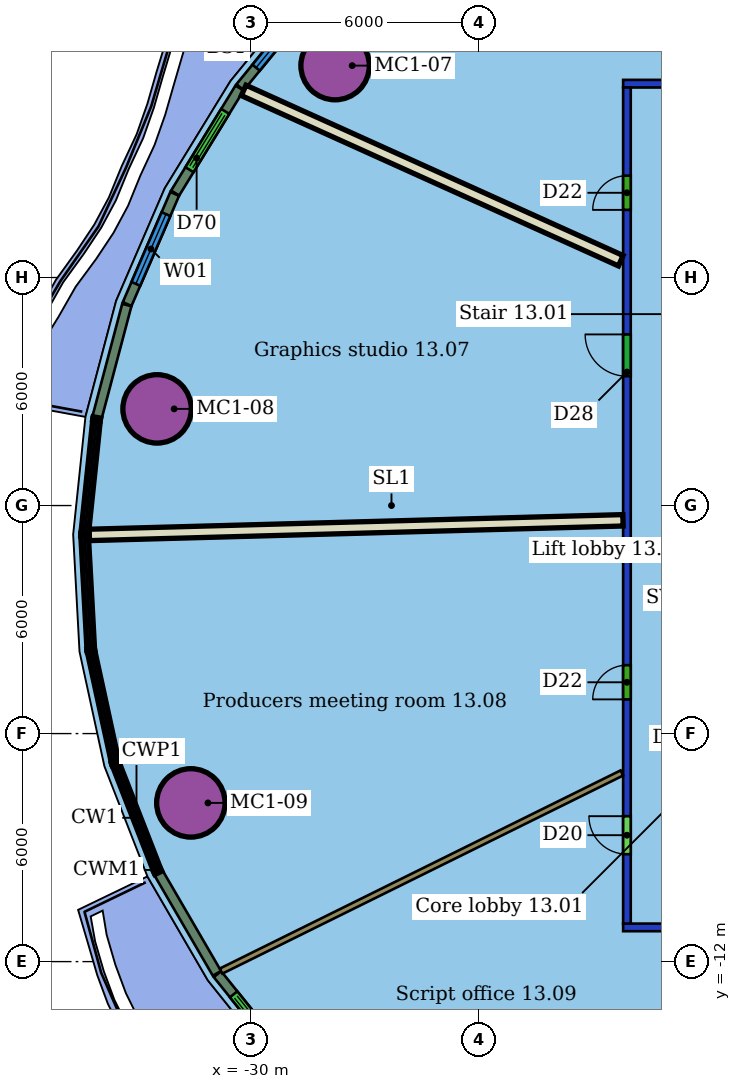
"""IFC4 building model, lengths in metres.
Left out: names, types, materials, properties, quantities, classifications, styles, units other than length and angle.
Written with IfcOpenShell. Run it as: python <this file> out.ifc"""

import sys

from ifc_helpers import new_model, si_unit, direction, frame, frame_2d, origin, origin_2d, place, context, subcontext, project, spatial, rectangle, hollow_circle, extrude, element, fill, save


model = new_model("IFC4")
c1 = context("Model", 3, precision=1e-05, world=origin(), true_north=direction((0.0, 1.0)))
c2 = subcontext(c1, "Body", "Model", "MODEL_VIEW")
j1 = project(units=[si_unit("LENGTHUNIT", "METRE"), si_unit("PLANEANGLEUNIT", "RADIAN")], contexts=[c1])
p1 = place(None, origin())
s1 = spatial("IfcSite", under=j1, at=p1, CompositionType="ELEMENT")
p2 = place(p1, origin())
s2 = spatial("IfcBuilding", under=s1, at=p2, CompositionType="ELEMENT")
p3 = place(p2, frame((0.0, 0.0, 65.6)))
s3 = spatial("IfcBuildingStorey", under=s2, at=p3, CompositionType="ELEMENT", Elevation=65.6)
for number, where, z_axis, x_axis in (
    (1, (-27.78, 11.576, 0.0), (0.0, 0.0, 1.0), (1.0, 0.0, 0.0)),
    (2, (-32.464, 2.543, 0.0), (0.0, 0.0, 1.0), (1.0, 0.0, 0.0)),
    (3, (-31.575, -7.824, 0.0), (0.0, 0.0, 1.0), (1.0, 0.0, 0.0)),
):
    element("IfcColumn", number, at=place(p3, frame(where, z_axis=z_axis, x_axis=x_axis)), inside=s3, PredefinedType="COLUMN", context=c2, shape_type="SweptSolid", body=[
        extrude(hollow_circle(Radius=0.9, WallThickness=0.06, at=origin_2d()), origin(), (0.0, 0.0, 1.0), 3.55),
    ])
p4 = place(p3, frame((8.2, -11.1, 0.0), z_axis=(0.0, 0.0, 1.0), x_axis=(-1.0, 0.0, 0.0)))
e4 = element("IfcWall", 4, at=p4, inside=s3, PredefinedType="PARTITIONING", context=c2, shape_type="SweptSolid", body=[
    extrude(rectangle(XDim=28.4, YDim=0.2, at=frame_2d((14.2, 0.0))), origin(), (0.0, 0.0, 1.0), 2.85),
])
p5 = place(p4, frame((19.964, 0.0, 0.0)))
e5 = element("IfcOpeningElement", 5, at=p5, cuts=e4, PredefinedType="OPENING", context=c2, shape_type="SweptSolid", body=[
    extrude(rectangle(XDim=1.1, YDim=2.1, at=frame_2d((0.55, 1.05))), frame((0.0, 0.11, 0.0), z_axis=(0.0, -1.0, 0.0), x_axis=(1.0, 0.0, 0.0)), (0.0, 0.0, 1.0), 0.22),
])
p6 = place(p4, frame((15.239, 0.0, 0.0)))
e6 = element("IfcOpeningElement", 6, at=p6, cuts=e4, PredefinedType="OPENING", context=c2, shape_type="SweptSolid", body=[
    extrude(rectangle(XDim=1.5, YDim=2.1, at=frame_2d((0.75, 1.05))), frame((0.0, 0.11, 0.0), z_axis=(0.0, -1.0, 0.0), x_axis=(1.0, 0.0, 0.0)), (0.0, 0.0, 1.0), 0.22),
])
p7 = place(p4, frame((7.453, 0.0, 0.0)))
e7 = element("IfcOpeningElement", 7, at=p7, cuts=e4, PredefinedType="OPENING", context=c2, shape_type="SweptSolid", body=[
    extrude(rectangle(XDim=1.8, YDim=2.1, at=frame_2d((0.9, 1.05))), frame((0.0, 0.11, 0.0), z_axis=(0.0, -1.0, 0.0), x_axis=(1.0, 0.0, 0.0)), (0.0, 0.0, 1.0), 0.22),
])
p8 = place(p3, frame((-20.1, -11.0, 0.0), z_axis=(0.0, 0.0, 1.0), x_axis=(0.0, 1.0, 0.0)))
e8 = element("IfcWall", 8, at=p8, inside=s3, PredefinedType="PARTITIONING", context=c2, shape_type="SweptSolid", body=[
    extrude(rectangle(XDim=22.0, YDim=0.2, at=frame_2d((11.0, 0.0))), origin(), (0.0, 0.0, 1.0), 2.85),
])
p9 = place(p8, frame((18.78, 0.0, 0.0)))
e9 = element("IfcOpeningElement", 9, at=p9, cuts=e8, PredefinedType="OPENING", context=c2, shape_type="SweptSolid", body=[
    extrude(rectangle(XDim=0.9, YDim=2.1, at=frame_2d((0.45, 1.05))), frame((0.0, 0.11, 0.0), z_axis=(0.0, -1.0, 0.0), x_axis=(1.0, 0.0, 0.0)), (0.0, 0.0, 1.0), 0.22),
])
p10 = place(p8, frame((14.403, 0.0, 0.0)))
e10 = element("IfcOpeningElement", 10, at=p10, cuts=e8, PredefinedType="OPENING", context=c2, shape_type="SweptSolid", body=[
    extrude(rectangle(XDim=1.1, YDim=2.1, at=frame_2d((0.55, 1.05))), frame((0.0, 0.11, 0.0), z_axis=(0.0, -1.0, 0.0), x_axis=(1.0, 0.0, 0.0)), (0.0, 0.0, 1.0), 0.22),
])
p11 = place(p8, frame((5.9, 0.0, 0.0)))
e11 = element("IfcOpeningElement", 11, at=p11, cuts=e8, PredefinedType="OPENING", context=c2, shape_type="SweptSolid", body=[
    extrude(rectangle(XDim=0.9, YDim=2.1, at=frame_2d((0.45, 1.05))), frame((0.0, 0.11, 0.0), z_axis=(0.0, -1.0, 0.0), x_axis=(1.0, 0.0, 0.0)), (0.0, 0.0, 1.0), 0.22),
])
p12 = place(p8, frame((1.826, 0.0, 0.0)))
e12 = element("IfcOpeningElement", 12, at=p12, cuts=e8, PredefinedType="OPENING", context=c2, shape_type="SweptSolid", body=[
    extrude(rectangle(XDim=1.0, YDim=2.1, at=frame_2d((0.5, 1.05))), frame((0.0, 0.11, 0.0), z_axis=(0.0, -1.0, 0.0), x_axis=(1.0, 0.0, 0.0)), (0.0, 0.0, 1.0), 0.22),
])
p13 = place(p3, frame((-20.2, 11.1, 0.0), z_axis=(0.0, 0.0, 1.0), x_axis=(1.0, 0.0, 0.0)))
e13 = element("IfcWall", 13, at=p13, inside=s3, PredefinedType="PARTITIONING", context=c2, shape_type="SweptSolid", body=[
    extrude(rectangle(XDim=28.4, YDim=0.2, at=frame_2d((14.2, 0.0))), origin(), (0.0, 0.0, 1.0), 2.85),
])
p14 = place(p13, frame((23.828, 0.0, 0.0)))
e14 = element("IfcOpeningElement", 14, at=p14, cuts=e13, PredefinedType="OPENING", context=c2, shape_type="SweptSolid", body=[
    extrude(rectangle(XDim=1.5, YDim=2.1, at=frame_2d((0.75, 1.05))), frame((0.0, 0.11, 0.0), z_axis=(0.0, -1.0, 0.0), x_axis=(1.0, 0.0, 0.0)), (0.0, 0.0, 1.0), 0.22),
])
p15 = place(p13, frame((19.006, 0.0, 0.0)))
e15 = element("IfcOpeningElement", 15, at=p15, cuts=e13, PredefinedType="OPENING", context=c2, shape_type="SweptSolid", body=[
    extrude(rectangle(XDim=1.0, YDim=2.1, at=frame_2d((0.5, 1.05))), frame((0.0, 0.11, 0.0), z_axis=(0.0, -1.0, 0.0), x_axis=(1.0, 0.0, 0.0)), (0.0, 0.0, 1.0), 0.22),
])
p16 = place(p13, frame((10.323, 0.0, 0.0)))
e16 = element("IfcOpeningElement", 16, at=p16, cuts=e13, PredefinedType="OPENING", context=c2, shape_type="SweptSolid", body=[
    extrude(rectangle(XDim=1.2, YDim=2.1, at=frame_2d((0.6, 1.05))), frame((0.0, 0.11, 0.0), z_axis=(0.0, -1.0, 0.0), x_axis=(1.0, 0.0, 0.0)), (0.0, 0.0, 1.0), 0.22),
])
p17 = place(p13, frame((6.36, 0.0, 0.0)))
e17 = element("IfcOpeningElement", 17, at=p17, cuts=e13, PredefinedType="OPENING", context=c2, shape_type="SweptSolid", body=[
    extrude(rectangle(XDim=1.0, YDim=2.1, at=frame_2d((0.5, 1.05))), frame((0.0, 0.11, 0.0), z_axis=(0.0, -1.0, 0.0), x_axis=(1.0, 0.0, 0.0)), (0.0, 0.0, 1.0), 0.22),
])
p18 = place(p3, frame((-22.749, 17.95, 0.0), z_axis=(0.0, 0.0, 1.0), x_axis=(0.682209065128, -0.731157159205, 0.0)))
e18 = element("IfcWall", 18, at=p18, inside=s3, PredefinedType="PARTITIONING", context=c2, shape_type="SweptSolid", body=[
    extrude(rectangle(XDim=9.163, YDim=0.15, at=frame_2d((4.581, 0.0))), origin(), (0.0, 0.0, 1.0), 3.55),
])
p19 = place(p3, frame((-30.186, 10.924, 0.0), z_axis=(0.0, 0.0, 1.0), x_axis=(0.91135893381, -0.411612552973, 0.0)))
e19 = element("IfcWall", 19, at=p19, inside=s3, PredefinedType="PARTITIONING", context=c2, shape_type="SweptSolid", body=[
    extrude(rectangle(XDim=10.889, YDim=0.3, at=frame_2d((5.445, 0.0))), origin(), (0.0, 0.0, 1.0), 3.55),
])
p20 = place(p3, frame((-34.247, -0.773, 0.0), z_axis=(0.0, 0.0, 1.0), x_axis=(0.999625818084, 0.027353680181, 0.0)))
e20 = element("IfcWall", 20, at=p20, inside=s3, PredefinedType="PARTITIONING", context=c2, shape_type="SweptSolid", body=[
    extrude(rectangle(XDim=14.049, YDim=0.3, at=frame_2d((7.024, 0.0))), origin(), (0.0, 0.0, 1.0), 3.55),
])
p21 = place(p3, frame((-30.78, -12.25, 0.0), z_axis=(0.0, 0.0, 1.0), x_axis=(0.89644340997, 0.443158225379, 0.0)))
e21 = element("IfcWall", 21, at=p21, inside=s3, PredefinedType="PARTITIONING", context=c2, shape_type="SweptSolid", body=[
    extrude(rectangle(XDim=11.765, YDim=0.15, at=frame_2d((5.882, 0.0))), origin(), (0.0, 0.0, 1.0), 3.55),
])
p22 = place(p3, frame((-23.706, -18.873, 0.0), z_axis=(0.0, 0.0, 1.0), x_axis=(0.684203954535, 0.729290716106, 0.0)))
e22 = element("IfcWall", 22, at=p22, inside=s3, PredefinedType="PARTITIONING", context=c2, shape_type="SweptSolid", body=[
    extrude(rectangle(XDim=10.38, YDim=0.3, at=frame_2d((5.19, 0.0))), origin(), (0.0, 0.0, 1.0), 3.55),
])
p23 = place(p3, frame((-28.172, 13.585, 0.0), z_axis=(0.0, 0.0, 1.0), x_axis=(-0.632874527105, -0.774254372246, 0.0)))
e23 = element("IfcWall", 23, at=p23, inside=s3, PredefinedType="SOLIDWALL", context=c2, shape_type="SweptSolid", body=[
    extrude(rectangle(XDim=3.331, YDim=0.25, at=frame_2d((1.666, 0.0))), origin(), (0.0, 0.0, 1.0), 3.15),
])
p24 = place(p23, frame((0.666, 0.0, 0.8)))
e24 = element("IfcOpeningElement", 24, at=p24, cuts=e23, PredefinedType="OPENING", context=c2, shape_type="SweptSolid", body=[
    extrude(rectangle(XDim=2.0, YDim=2.2, at=frame_2d((1.0, 1.1))), frame((0.0, 0.135, 0.0), z_axis=(0.0, -1.0, 0.0), x_axis=(1.0, 0.0, 0.0)), (0.0, 0.0, 1.0), 0.27),
])
p25 = place(p3, frame((-30.294, 10.985, 0.0), z_axis=(0.0, 0.0, 1.0), x_axis=(-0.522692781457, -0.852521117752, 0.0)))
e25 = element("IfcWall", 25, at=p25, inside=s3, PredefinedType="SOLIDWALL", context=c2, shape_type="SweptSolid", body=[
    extrude(rectangle(XDim=3.241, YDim=0.25, at=frame_2d((1.62, 0.0))), origin(), (0.0, 0.0, 1.0), 3.15),
])
p26 = place(p25, frame((0.72, 0.0, 0.0)))
e26 = element("IfcOpeningElement", 26, at=p26, cuts=e25, PredefinedType="OPENING", context=c2, shape_type="SweptSolid", body=[
    extrude(rectangle(XDim=1.8, YDim=2.4, at=frame_2d((0.9, 1.2))), frame((0.0, 0.135, 0.0), z_axis=(0.0, -1.0, 0.0), x_axis=(1.0, 0.0, 0.0)), (0.0, 0.0, 1.0), 0.27),
])
p27 = place(p3, frame((-32.0, 8.2, 0.0), z_axis=(0.0, 0.0, 1.0), x_axis=(-0.396530812493, -0.918021413009, 0.0)))
e27 = element("IfcWall", 27, at=p27, inside=s3, PredefinedType="SOLIDWALL", context=c2, shape_type="SweptSolid", body=[
    extrude(rectangle(XDim=3.157, YDim=0.25, at=frame_2d((1.579, 0.0))), origin(), (0.0, 0.0, 1.0), 3.15),
])
p28 = place(p27, frame((0.579, 0.0, 0.8)))
e28 = element("IfcOpeningElement", 28, at=p28, cuts=e27, PredefinedType="OPENING", context=c2, shape_type="SweptSolid", body=[
    extrude(rectangle(XDim=2.0, YDim=2.2, at=frame_2d((1.0, 1.1))), frame((0.0, 0.135, 0.0), z_axis=(0.0, -1.0, 0.0), x_axis=(1.0, 0.0, 0.0)), (0.0, 0.0, 1.0), 0.27),
])
for number, where, z_axis, x_axis in (
    (29, (-33.26, 5.276, 0.0), (0.0, 0.0, 1.0), (-0.256, -0.967, 0.0)),
    (30, (-32.421, -9.676, 0.0), (0.0, 0.0, 1.0), (0.503, -0.864, 0.0)),
):
    element("IfcWall", number, at=place(p3, frame(where, z_axis=z_axis, x_axis=x_axis)), inside=s3, PredefinedType="SOLIDWALL", context=c2, shape_type="SweptSolid", body=[
        extrude(rectangle(XDim=3.046, YDim=0.25, at=frame_2d((1.523, 0.0))), origin(), (0.0, 0.0, 1.0), 3.15),
    ])
p29 = place(p3, frame((-30.874, -12.331, 0.0), z_axis=(0.0, 0.0, 1.0), x_axis=(0.625543346061, -0.780189414308, 0.0)))
e31 = element("IfcWall", 31, at=p29, inside=s3, PredefinedType="SOLIDWALL", context=c2, shape_type="SweptSolid", body=[
    extrude(rectangle(XDim=3.157, YDim=0.25, at=frame_2d((1.579, 0.0))), origin(), (0.0, 0.0, 1.0), 3.15),
])
p30 = place(p29, frame((0.679, 0.0, 0.0)))
e32 = element("IfcOpeningElement", 32, at=p30, cuts=e31, PredefinedType="OPENING", context=c2, shape_type="SweptSolid", body=[
    extrude(rectangle(XDim=1.8, YDim=2.4, at=frame_2d((0.9, 1.2))), frame((0.0, 0.135, 0.0), z_axis=(0.0, -1.0, 0.0), x_axis=(1.0, 0.0, 0.0)), (0.0, 0.0, 1.0), 0.27),
])
p31 = place(p9, origin())
e33 = element("IfcDoor", 33, at=p31, inside=s3, OperationType="SINGLE_SWING_LEFT", PredefinedType="DOOR", context=c2, shape_type="SweptSolid", body=[
    extrude(rectangle(XDim=0.9, YDim=2.1, at=frame_2d((0.45, 1.05))), frame((0.0, 0.025, 0.0), z_axis=(0.0, -1.0, 0.0), x_axis=(1.0, 0.0, 0.0)), (0.0, 0.0, 1.0), 0.05),
])
fill(e9, e33)
p32 = place(p10, origin())
e34 = element("IfcDoor", 34, at=p32, inside=s3, OperationType="SINGLE_SWING_RIGHT", PredefinedType="DOOR", context=c2, shape_type="SweptSolid", body=[
    extrude(rectangle(XDim=1.1, YDim=2.1, at=frame_2d((0.55, 1.05))), frame((0.0, 0.025, 0.0), z_axis=(0.0, -1.0, 0.0), x_axis=(1.0, 0.0, 0.0)), (0.0, 0.0, 1.0), 0.05),
])
fill(e10, e34)
p33 = place(p11, origin())
e35 = element("IfcDoor", 35, at=p33, inside=s3, OperationType="SINGLE_SWING_LEFT", PredefinedType="DOOR", context=c2, shape_type="SweptSolid", body=[
    extrude(rectangle(XDim=0.9, YDim=2.1, at=frame_2d((0.45, 1.05))), frame((0.0, 0.025, 0.0), z_axis=(0.0, -1.0, 0.0), x_axis=(1.0, 0.0, 0.0)), (0.0, 0.0, 1.0), 0.05),
])
fill(e11, e35)
p34 = place(p12, origin())
e36 = element("IfcDoor", 36, at=p34, inside=s3, OperationType="SINGLE_SWING_RIGHT", PredefinedType="DOOR", context=c2, shape_type="SweptSolid", body=[
    extrude(rectangle(XDim=1.0, YDim=2.1, at=frame_2d((0.5, 1.05))), frame((0.0, 0.025, 0.0), z_axis=(0.0, -1.0, 0.0), x_axis=(1.0, 0.0, 0.0)), (0.0, 0.0, 1.0), 0.05),
])
fill(e12, e36)
p35 = place(p24, origin())
e37 = element("IfcWindow", 37, at=p35, inside=s3, PartitioningType="SINGLE_PANEL", PredefinedType="WINDOW", context=c2, shape_type="SweptSolid", body=[
    extrude(rectangle(XDim=2.0, YDim=2.2, at=frame_2d((1.0, 1.1))), frame((0.0, 0.03, 0.0), z_axis=(0.0, -1.0, 0.0), x_axis=(1.0, 0.0, 0.0)), (0.0, 0.0, 1.0), 0.06),
])
fill(e24, e37)
p36 = place(p26, origin())
e38 = element("IfcDoor", 38, at=p36, inside=s3, OperationType="DOUBLE_DOOR_SLIDING", PredefinedType="DOOR", context=c2, shape_type="SweptSolid", body=[
    extrude(rectangle(XDim=1.8, YDim=2.4, at=frame_2d((0.9, 1.2))), frame((0.0, 0.025, 0.0), z_axis=(0.0, -1.0, 0.0), x_axis=(1.0, 0.0, 0.0)), (0.0, 0.0, 1.0), 0.05),
])
fill(e26, e38)
p37 = place(p28, origin())
e39 = element("IfcWindow", 39, at=p37, inside=s3, PartitioningType="SINGLE_PANEL", PredefinedType="WINDOW", context=c2, shape_type="SweptSolid", body=[
    extrude(rectangle(XDim=2.0, YDim=2.2, at=frame_2d((1.0, 1.1))), frame((0.0, 0.03, 0.0), z_axis=(0.0, -1.0, 0.0), x_axis=(1.0, 0.0, 0.0)), (0.0, 0.0, 1.0), 0.06),
])
fill(e28, e39)
p38 = place(p30, origin())
e40 = element("IfcDoor", 40, at=p38, inside=s3, OperationType="DOUBLE_DOOR_SLIDING", PredefinedType="DOOR", context=c2, shape_type="SweptSolid", body=[
    extrude(rectangle(XDim=1.8, YDim=2.4, at=frame_2d((0.9, 1.2))), frame((0.0, 0.025, 0.0), z_axis=(0.0, -1.0, 0.0), x_axis=(1.0, 0.0, 0.0)), (0.0, 0.0, 1.0), 0.05),
])
fill(e32, e40)
save(model, sys.argv[1])
